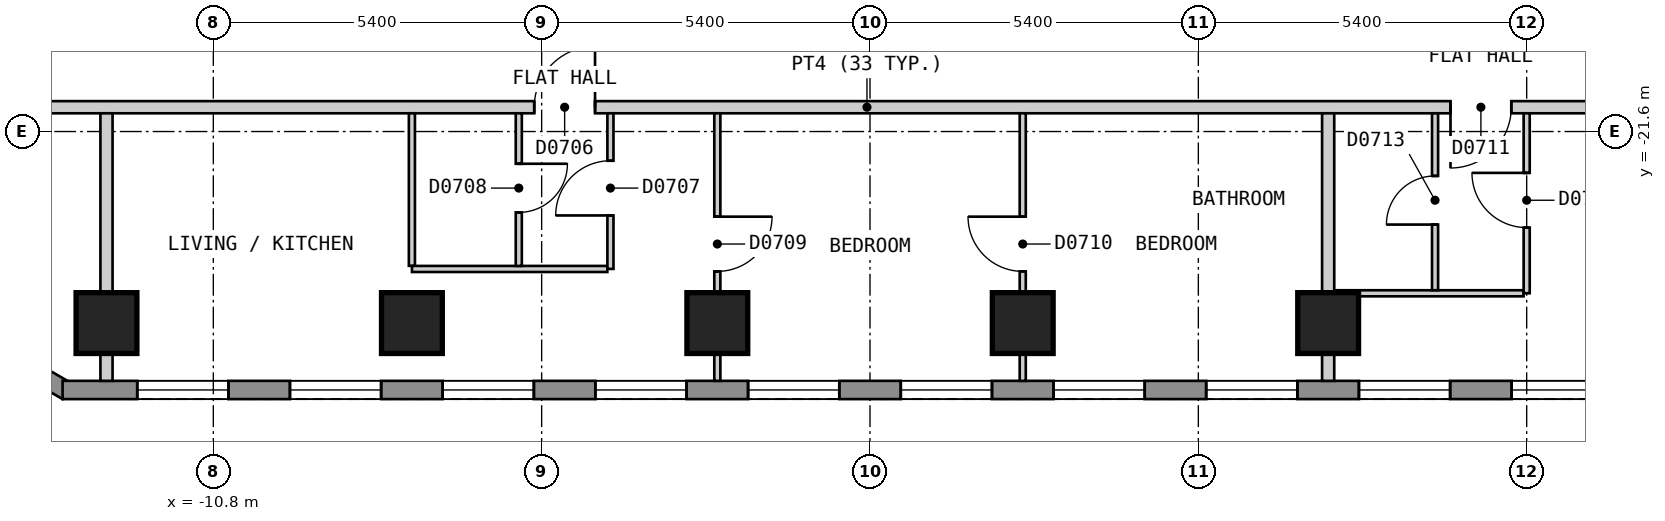
"""IFC4 building model, lengths in metres.
Left out: names, types, materials, properties, quantities, classifications, styles, units other than length and angle.
Written with IfcOpenShell. Run it as: python <this file> out.ifc"""

import sys

from ifc_helpers import new_model, si_unit, direction, frame, frame_2d, origin, origin_2d, place, context, subcontext, project, spatial, polyline, rectangle, outline, extrude, element, fill, save


model = new_model("IFC4")
c1 = context("Model", 3, precision=1e-05, world=origin(), true_north=direction((0.0, 1.0)))
c2 = subcontext(c1, "Body", "Model", "MODEL_VIEW")
j1 = project(units=[si_unit("LENGTHUNIT", "METRE"), si_unit("PLANEANGLEUNIT", "RADIAN")], contexts=[c1])
p1 = place(None, origin())
s1 = spatial("IfcSite", under=j1, at=p1, CompositionType="ELEMENT")
p2 = place(p1, origin())
s2 = spatial("IfcBuilding", under=s1, at=p2, CompositionType="ELEMENT")
p3 = place(p2, frame((0.0, 0.0, 93.0)))
s3 = spatial("IfcBuildingStorey", under=s2, at=p3, CompositionType="ELEMENT", Elevation=93.0)
for number, where, z_axis, x_axis in (
    (1, (-12.557, -24.75, 0.0), (0.0, 0.0, 1.0), (1.0, 0.0, 0.0)),
    (2, (-7.534, -24.75, 0.0), (0.0, 0.0, 1.0), (1.0, 0.0, 0.0)),
    (3, (-2.511, -24.75, 0.0), (0.0, 0.0, 1.0), (1.0, 0.0, 0.0)),
    (4, (2.512, -24.75, 0.0), (0.0, 0.0, 1.0), (1.0, 0.0, 0.0)),
    (5, (7.535, -24.75, 0.0), (0.0, 0.0, 1.0), (1.0, 0.0, 0.0)),
):
    element("IfcColumn", number, at=place(p3, frame(where, z_axis=z_axis, x_axis=x_axis)), inside=s3, PredefinedType="COLUMN", context=c2, shape_type="SweptSolid", body=[
        extrude(rectangle(XDim=1.0, YDim=1.0, at=origin_2d()), origin(), (0.0, 0.0, 1.0), 3.0),
    ])
p4 = place(p3, frame((-17.534, -23.37, 0.0), z_axis=(0.0, 0.0, 1.0), x_axis=(0.866010750942, -0.50002537861, 0.0)))
e6 = element("IfcWall", 6, at=p4, inside=s3, PredefinedType="SOLIDWALL", context=c2, shape_type="SweptSolid", body=[
    extrude(outline(polyline([(0.0, -0.15), (5.0, -0.15), (4.919, 0.15), (0.08, 0.15), (0.0, -0.15)])), origin(), (0.0, 0.0, 1.0), 2.7),
])
p5 = place(p4, frame((0.65, 0.0, 0.15)))
e7 = element("IfcOpeningElement", 7, at=p5, cuts=e6, PredefinedType="OPENING", context=c2, shape_type="SweptSolid", body=[
    extrude(rectangle(XDim=1.2, YDim=2.1, at=frame_2d((0.6, 1.05))), frame((0.0, 0.16, 0.0), z_axis=(0.0, -1.0, 0.0), x_axis=(1.0, 0.0, 0.0)), (0.0, 0.0, 1.0), 0.32),
])
p6 = place(p4, frame((3.15, 0.0, 0.15)))
e8 = element("IfcOpeningElement", 8, at=p6, cuts=e6, PredefinedType="OPENING", context=c2, shape_type="SweptSolid", body=[
    extrude(rectangle(XDim=1.2, YDim=2.1, at=frame_2d((0.6, 1.05))), frame((0.0, 0.16, 0.0), z_axis=(0.0, -1.0, 0.0), x_axis=(1.0, 0.0, 0.0)), (0.0, 0.0, 1.0), 0.32),
])
p7 = place(p3, frame((-13.279, -25.85, 0.0), z_axis=(0.0, 0.0, 1.0), x_axis=(1.0, 0.0, 0.0)))
e9 = element("IfcWall", 9, at=p7, inside=s3, PredefinedType="SOLIDWALL", context=c2, shape_type="SweptSolid", body=[
    extrude(outline(polyline([(0.0, -0.15), (26.558, -0.15), (26.478, 0.15), (0.08, 0.15), (0.0, -0.15)])), origin(), (0.0, 0.0, 1.0), 2.7),
])
p8 = place(p7, frame((1.228, 0.0, 0.15)))
e10 = element("IfcOpeningElement", 10, at=p8, cuts=e9, PredefinedType="OPENING", context=c2, shape_type="SweptSolid", body=[
    extrude(rectangle(XDim=1.5, YDim=2.1, at=frame_2d((0.75, 1.05))), frame((0.0, 0.16, 0.0), z_axis=(0.0, -1.0, 0.0), x_axis=(1.0, 0.0, 0.0)), (0.0, 0.0, 1.0), 0.32),
])
p9 = place(p7, frame((3.739, 0.0, 0.15)))
e11 = element("IfcOpeningElement", 11, at=p9, cuts=e9, PredefinedType="OPENING", context=c2, shape_type="SweptSolid", body=[
    extrude(rectangle(XDim=1.5, YDim=2.1, at=frame_2d((0.75, 1.05))), frame((0.0, 0.16, 0.0), z_axis=(0.0, -1.0, 0.0), x_axis=(1.0, 0.0, 0.0)), (0.0, 0.0, 1.0), 0.32),
])
p10 = place(p7, frame((6.251, 0.0, 0.15)))
e12 = element("IfcOpeningElement", 12, at=p10, cuts=e9, PredefinedType="OPENING", context=c2, shape_type="SweptSolid", body=[
    extrude(rectangle(XDim=1.5, YDim=2.1, at=frame_2d((0.75, 1.05))), frame((0.0, 0.16, 0.0), z_axis=(0.0, -1.0, 0.0), x_axis=(1.0, 0.0, 0.0)), (0.0, 0.0, 1.0), 0.32),
])
p11 = place(p7, frame((8.762, 0.0, 0.15)))
e13 = element("IfcOpeningElement", 13, at=p11, cuts=e9, PredefinedType="OPENING", context=c2, shape_type="SweptSolid", body=[
    extrude(rectangle(XDim=1.5, YDim=2.1, at=frame_2d((0.75, 1.05))), frame((0.0, 0.16, 0.0), z_axis=(0.0, -1.0, 0.0), x_axis=(1.0, 0.0, 0.0)), (0.0, 0.0, 1.0), 0.32),
])
p12 = place(p7, frame((11.274, 0.0, 0.15)))
e14 = element("IfcOpeningElement", 14, at=p12, cuts=e9, PredefinedType="OPENING", context=c2, shape_type="SweptSolid", body=[
    extrude(rectangle(XDim=1.5, YDim=2.1, at=frame_2d((0.75, 1.05))), frame((0.0, 0.16, 0.0), z_axis=(0.0, -1.0, 0.0), x_axis=(1.0, 0.0, 0.0)), (0.0, 0.0, 1.0), 0.32),
])
p13 = place(p7, frame((13.785, 0.0, 0.15)))
e15 = element("IfcOpeningElement", 15, at=p13, cuts=e9, PredefinedType="OPENING", context=c2, shape_type="SweptSolid", body=[
    extrude(rectangle(XDim=1.5, YDim=2.1, at=frame_2d((0.75, 1.05))), frame((0.0, 0.16, 0.0), z_axis=(0.0, -1.0, 0.0), x_axis=(1.0, 0.0, 0.0)), (0.0, 0.0, 1.0), 0.32),
])
p14 = place(p7, frame((16.297, 0.0, 0.15)))
e16 = element("IfcOpeningElement", 16, at=p14, cuts=e9, PredefinedType="OPENING", context=c2, shape_type="SweptSolid", body=[
    extrude(rectangle(XDim=1.5, YDim=2.1, at=frame_2d((0.75, 1.05))), frame((0.0, 0.16, 0.0), z_axis=(0.0, -1.0, 0.0), x_axis=(1.0, 0.0, 0.0)), (0.0, 0.0, 1.0), 0.32),
])
p15 = place(p7, frame((18.808, 0.0, 0.15)))
e17 = element("IfcOpeningElement", 17, at=p15, cuts=e9, PredefinedType="OPENING", context=c2, shape_type="SweptSolid", body=[
    extrude(rectangle(XDim=1.5, YDim=2.1, at=frame_2d((0.75, 1.05))), frame((0.0, 0.16, 0.0), z_axis=(0.0, -1.0, 0.0), x_axis=(1.0, 0.0, 0.0)), (0.0, 0.0, 1.0), 0.32),
])
p16 = place(p7, frame((21.32, 0.0, 0.15)))
e18 = element("IfcOpeningElement", 18, at=p16, cuts=e9, PredefinedType="OPENING", context=c2, shape_type="SweptSolid", body=[
    extrude(rectangle(XDim=1.5, YDim=2.1, at=frame_2d((0.75, 1.05))), frame((0.0, 0.16, 0.0), z_axis=(0.0, -1.0, 0.0), x_axis=(1.0, 0.0, 0.0)), (0.0, 0.0, 1.0), 0.32),
])
p17 = place(p7, frame((23.831, 0.0, 0.15)))
e19 = element("IfcOpeningElement", 19, at=p17, cuts=e9, PredefinedType="OPENING", context=c2, shape_type="SweptSolid", body=[
    extrude(rectangle(XDim=1.5, YDim=2.1, at=frame_2d((0.75, 1.05))), frame((0.0, 0.16, 0.0), z_axis=(0.0, -1.0, 0.0), x_axis=(1.0, 0.0, 0.0)), (0.0, 0.0, 1.0), 0.32),
])
p18 = place(p3, frame((-15.499, -21.2, 0.0), z_axis=(0.0, 0.0, 1.0), x_axis=(1.0, 0.0, 0.0)))
e20 = element("IfcWall", 20, at=p18, inside=s3, PredefinedType="PARTITIONING", context=c2, shape_type="SweptSolid", body=[
    extrude(rectangle(XDim=30.898, YDim=0.2, at=frame_2d((15.449, 0.0))), origin(), (0.0, 0.0, 1.0), 2.7),
])
p19 = place(p18, frame((9.977, 0.0, 0.0)))
e21 = element("IfcOpeningElement", 21, at=p19, cuts=e20, PredefinedType="OPENING", context=c2, shape_type="SweptSolid", body=[
    extrude(rectangle(XDim=1.0, YDim=2.1, at=frame_2d((0.5, 1.05))), frame((0.0, 0.11, 0.0), z_axis=(0.0, -1.0, 0.0), x_axis=(1.0, 0.0, 0.0)), (0.0, 0.0, 1.0), 0.22),
])
p20 = place(p18, frame((25.046, 0.0, 0.0)))
e22 = element("IfcOpeningElement", 22, at=p20, cuts=e20, PredefinedType="OPENING", context=c2, shape_type="SweptSolid", body=[
    extrude(rectangle(XDim=1.0, YDim=2.1, at=frame_2d((0.5, 1.05))), frame((0.0, 0.11, 0.0), z_axis=(0.0, -1.0, 0.0), x_axis=(1.0, 0.0, 0.0)), (0.0, 0.0, 1.0), 0.22),
])
p21 = place(p3, frame((-7.534, -21.3, 0.0), z_axis=(0.0, 0.0, 1.0), x_axis=(0.0, -1.0, 0.0)))
e23 = element("IfcWall", 23, at=p21, inside=s3, PredefinedType="PARTITIONING", context=c2, shape_type="SweptSolid", body=[
    extrude(rectangle(XDim=2.509, YDim=0.1, at=frame_2d((1.254, 0.0))), origin(), (0.0, 0.0, 1.0), 2.7),
])
p22 = place(p3, frame((-2.511, -21.3, 0.0), z_axis=(0.0, 0.0, 1.0), x_axis=(0.0, -1.0, 0.0)))
e24 = element("IfcWall", 24, at=p22, inside=s3, PredefinedType="PARTITIONING", context=c2, shape_type="SweptSolid", body=[
    extrude(rectangle(XDim=4.4, YDim=0.1, at=frame_2d((2.2, 0.0))), origin(), (0.0, 0.0, 1.0), 2.7),
])
p23 = place(p22, frame((1.7, 0.0, 0.0)))
e25 = element("IfcOpeningElement", 25, at=p23, cuts=e24, PredefinedType="OPENING", context=c2, shape_type="SweptSolid", body=[
    extrude(rectangle(XDim=0.9, YDim=2.1, at=frame_2d((0.45, 1.05))), frame((0.0, 0.06, 0.0), z_axis=(0.0, -1.0, 0.0), x_axis=(1.0, 0.0, 0.0)), (0.0, 0.0, 1.0), 0.12),
])
p24 = place(p3, frame((-7.533, -23.86, 0.0), z_axis=(0.0, 0.0, 1.0), x_axis=(1.0, 0.0, 0.0)))
e26 = element("IfcWall", 26, at=p24, inside=s3, PredefinedType="PARTITIONING", context=c2, shape_type="SweptSolid", body=[
    extrude(rectangle(XDim=3.213, YDim=0.1, at=frame_2d((1.606, 0.0))), origin(), (0.0, 0.0, 1.0), 2.7),
])
p25 = place(p3, frame((7.635, -24.26, 0.0), z_axis=(0.0, 0.0, 1.0), x_axis=(1.0, 0.0, 0.0)))
e27 = element("IfcWall", 27, at=p25, inside=s3, PredefinedType="PARTITIONING", context=c2, shape_type="SweptSolid", body=[
    extrude(rectangle(XDim=3.114, YDim=0.1, at=frame_2d((1.557, 0.0))), origin(), (0.0, 0.0, 1.0), 2.7),
])
p26 = place(p3, frame((9.293, -24.21, 0.0), z_axis=(0.0, 0.0, 1.0), x_axis=(0.0, 1.0, 0.0)))
e28 = element("IfcWall", 28, at=p26, inside=s3, PredefinedType="PARTITIONING", context=c2, shape_type="SweptSolid", body=[
    extrude(rectangle(XDim=2.91, YDim=0.1, at=frame_2d((1.455, 0.0))), origin(), (0.0, 0.0, 1.0), 2.7),
])
p27 = place(p26, frame((1.08, 0.0, 0.0)))
e29 = element("IfcOpeningElement", 29, at=p27, cuts=e28, PredefinedType="OPENING", context=c2, shape_type="SweptSolid", body=[
    extrude(rectangle(XDim=0.8, YDim=2.1, at=frame_2d((0.4, 1.05))), frame((0.0, 0.06, 0.0), z_axis=(0.0, -1.0, 0.0), x_axis=(1.0, 0.0, 0.0)), (0.0, 0.0, 1.0), 0.12),
])
p28 = place(p3, frame((10.8, -24.259, 0.0), z_axis=(0.0, 0.0, 1.0), x_axis=(0.0, 1.0, 0.0)))
e30 = element("IfcWall", 30, at=p28, inside=s3, PredefinedType="PARTITIONING", context=c2, shape_type="SweptSolid", body=[
    extrude(rectangle(XDim=2.959, YDim=0.1, at=frame_2d((1.479, 0.0))), origin(), (0.0, 0.0, 1.0), 2.7),
])
p29 = place(p28, frame((1.079, 0.0, 0.0)))
e31 = element("IfcOpeningElement", 31, at=p29, cuts=e30, PredefinedType="OPENING", context=c2, shape_type="SweptSolid", body=[
    extrude(rectangle(XDim=0.9, YDim=2.1, at=frame_2d((0.45, 1.05))), frame((0.0, 0.06, 0.0), z_axis=(0.0, -1.0, 0.0), x_axis=(1.0, 0.0, 0.0)), (0.0, 0.0, 1.0), 0.12),
])
p30 = place(p3, frame((2.512, -25.7, 0.0), z_axis=(0.0, 0.0, 1.0), x_axis=(0.0, 1.0, 0.0)))
e32 = element("IfcWall", 32, at=p30, inside=s3, PredefinedType="PARTITIONING", context=c2, shape_type="SweptSolid", body=[
    extrude(rectangle(XDim=4.4, YDim=0.1, at=frame_2d((2.2, 0.0))), origin(), (0.0, 0.0, 1.0), 2.7),
])
p31 = place(p30, frame((1.8, 0.0, 0.0)))
e33 = element("IfcOpeningElement", 33, at=p31, cuts=e32, PredefinedType="OPENING", context=c2, shape_type="SweptSolid", body=[
    extrude(rectangle(XDim=0.9, YDim=2.1, at=frame_2d((0.45, 1.05))), frame((0.0, 0.06, 0.0), z_axis=(0.0, -1.0, 0.0), x_axis=(1.0, 0.0, 0.0)), (0.0, 0.0, 1.0), 0.12),
])
p32 = place(p3, frame((-4.269, -23.859, 0.0), z_axis=(0.0, 0.0, 1.0), x_axis=(0.0, 1.0, 0.0)))
e34 = element("IfcWall", 34, at=p32, inside=s3, PredefinedType="PARTITIONING", context=c2, shape_type="SweptSolid", body=[
    extrude(rectangle(XDim=2.559, YDim=0.1, at=frame_2d((1.279, 0.0))), origin(), (0.0, 0.0, 1.0), 2.7),
])
p33 = place(p32, frame((0.879, 0.0, 0.0)))
e35 = element("IfcOpeningElement", 35, at=p33, cuts=e34, PredefinedType="OPENING", context=c2, shape_type="SweptSolid", body=[
    extrude(rectangle(XDim=0.9, YDim=2.1, at=frame_2d((0.45, 1.05))), frame((0.0, 0.06, 0.0), z_axis=(0.0, -1.0, 0.0), x_axis=(1.0, 0.0, 0.0)), (0.0, 0.0, 1.0), 0.12),
])
p34 = place(p3, frame((-5.776, -23.81, 0.0), z_axis=(0.0, 0.0, 1.0), x_axis=(0.0, 1.0, 0.0)))
e36 = element("IfcWall", 36, at=p34, inside=s3, PredefinedType="PARTITIONING", context=c2, shape_type="SweptSolid", body=[
    extrude(rectangle(XDim=2.51, YDim=0.1, at=frame_2d((1.255, 0.0))), origin(), (0.0, 0.0, 1.0), 2.7),
])
p35 = place(p34, frame((0.88, 0.0, 0.0)))
e37 = element("IfcOpeningElement", 37, at=p35, cuts=e36, PredefinedType="OPENING", context=c2, shape_type="SweptSolid", body=[
    extrude(rectangle(XDim=0.8, YDim=2.1, at=frame_2d((0.4, 1.05))), frame((0.0, 0.06, 0.0), z_axis=(0.0, -1.0, 0.0), x_axis=(1.0, 0.0, 0.0)), (0.0, 0.0, 1.0), 0.12),
])
p36 = place(p3, frame((7.535, -21.3, 0.0), z_axis=(0.0, 0.0, 1.0), x_axis=(0.0, -1.0, 0.0)))
e38 = element("IfcWall", 38, at=p36, inside=s3, PredefinedType="PARTITIONING", context=c2, shape_type="SweptSolid", body=[
    extrude(rectangle(XDim=2.98, YDim=0.2, at=frame_2d((1.49, 0.0))), origin(), (0.0, 0.0, 1.0), 2.7),
])
p37 = place(p3, frame((7.535, -25.7, 0.0), z_axis=(0.0, 0.0, 1.0), x_axis=(0.0, 1.0, 0.0)))
e39 = element("IfcWall", 39, at=p37, inside=s3, PredefinedType="PARTITIONING", context=c2, shape_type="SweptSolid", body=[
    extrude(rectangle(XDim=1.46, YDim=0.2, at=frame_2d((0.73, 0.0))), origin(), (0.0, 0.0, 1.0), 2.7),
])
p38 = place(p3, frame((-12.557, -25.7, 0.0), z_axis=(0.0, 0.0, 1.0), x_axis=(0.0, 1.0, 0.0)))
e40 = element("IfcWall", 40, at=p38, inside=s3, PredefinedType="PARTITIONING", context=c2, shape_type="SweptSolid", body=[
    extrude(rectangle(XDim=4.4, YDim=0.2, at=frame_2d((2.2, 0.0))), origin(), (0.0, 0.0, 1.0), 2.7),
])
p39 = place(p8, origin())
e41 = element("IfcWindow", 41, at=p39, inside=s3, PartitioningType="SINGLE_PANEL", PredefinedType="WINDOW", context=c2, shape_type="SweptSolid", body=[
    extrude(rectangle(XDim=1.5, YDim=2.1, at=frame_2d((0.75, 1.05))), frame((0.0, 0.03, 0.0), z_axis=(0.0, -1.0, 0.0), x_axis=(1.0, 0.0, 0.0)), (0.0, 0.0, 1.0), 0.06),
])
fill(e10, e41)
p40 = place(p9, origin())
e42 = element("IfcWindow", 42, at=p40, inside=s3, PartitioningType="SINGLE_PANEL", PredefinedType="WINDOW", context=c2, shape_type="SweptSolid", body=[
    extrude(rectangle(XDim=1.5, YDim=2.1, at=frame_2d((0.75, 1.05))), frame((0.0, 0.03, 0.0), z_axis=(0.0, -1.0, 0.0), x_axis=(1.0, 0.0, 0.0)), (0.0, 0.0, 1.0), 0.06),
])
fill(e11, e42)
p41 = place(p10, origin())
e43 = element("IfcWindow", 43, at=p41, inside=s3, PartitioningType="SINGLE_PANEL", PredefinedType="WINDOW", context=c2, shape_type="SweptSolid", body=[
    extrude(rectangle(XDim=1.5, YDim=2.1, at=frame_2d((0.75, 1.05))), frame((0.0, 0.03, 0.0), z_axis=(0.0, -1.0, 0.0), x_axis=(1.0, 0.0, 0.0)), (0.0, 0.0, 1.0), 0.06),
])
fill(e12, e43)
p42 = place(p11, origin())
e44 = element("IfcWindow", 44, at=p42, inside=s3, PartitioningType="SINGLE_PANEL", PredefinedType="WINDOW", context=c2, shape_type="SweptSolid", body=[
    extrude(rectangle(XDim=1.5, YDim=2.1, at=frame_2d((0.75, 1.05))), frame((0.0, 0.03, 0.0), z_axis=(0.0, -1.0, 0.0), x_axis=(1.0, 0.0, 0.0)), (0.0, 0.0, 1.0), 0.06),
])
fill(e13, e44)
p43 = place(p12, origin())
e45 = element("IfcWindow", 45, at=p43, inside=s3, PartitioningType="SINGLE_PANEL", PredefinedType="WINDOW", context=c2, shape_type="SweptSolid", body=[
    extrude(rectangle(XDim=1.5, YDim=2.1, at=frame_2d((0.75, 1.05))), frame((0.0, 0.03, 0.0), z_axis=(0.0, -1.0, 0.0), x_axis=(1.0, 0.0, 0.0)), (0.0, 0.0, 1.0), 0.06),
])
fill(e14, e45)
p44 = place(p13, origin())
e46 = element("IfcWindow", 46, at=p44, inside=s3, PartitioningType="SINGLE_PANEL", PredefinedType="WINDOW", context=c2, shape_type="SweptSolid", body=[
    extrude(rectangle(XDim=1.5, YDim=2.1, at=frame_2d((0.75, 1.05))), frame((0.0, 0.03, 0.0), z_axis=(0.0, -1.0, 0.0), x_axis=(1.0, 0.0, 0.0)), (0.0, 0.0, 1.0), 0.06),
])
fill(e15, e46)
p45 = place(p14, origin())
e47 = element("IfcWindow", 47, at=p45, inside=s3, PartitioningType="SINGLE_PANEL", PredefinedType="WINDOW", context=c2, shape_type="SweptSolid", body=[
    extrude(rectangle(XDim=1.5, YDim=2.1, at=frame_2d((0.75, 1.05))), frame((0.0, 0.03, 0.0), z_axis=(0.0, -1.0, 0.0), x_axis=(1.0, 0.0, 0.0)), (0.0, 0.0, 1.0), 0.06),
])
fill(e16, e47)
p46 = place(p15, origin())
e48 = element("IfcWindow", 48, at=p46, inside=s3, PartitioningType="SINGLE_PANEL", PredefinedType="WINDOW", context=c2, shape_type="SweptSolid", body=[
    extrude(rectangle(XDim=1.5, YDim=2.1, at=frame_2d((0.75, 1.05))), frame((0.0, 0.03, 0.0), z_axis=(0.0, -1.0, 0.0), x_axis=(1.0, 0.0, 0.0)), (0.0, 0.0, 1.0), 0.06),
])
fill(e17, e48)
p47 = place(p16, origin())
e49 = element("IfcWindow", 49, at=p47, inside=s3, PartitioningType="SINGLE_PANEL", PredefinedType="WINDOW", context=c2, shape_type="SweptSolid", body=[
    extrude(rectangle(XDim=1.5, YDim=2.1, at=frame_2d((0.75, 1.05))), frame((0.0, 0.03, 0.0), z_axis=(0.0, -1.0, 0.0), x_axis=(1.0, 0.0, 0.0)), (0.0, 0.0, 1.0), 0.06),
])
fill(e18, e49)
p48 = place(p17, origin())
e50 = element("IfcWindow", 50, at=p48, inside=s3, PartitioningType="SINGLE_PANEL", PredefinedType="WINDOW", context=c2, shape_type="SweptSolid", body=[
    extrude(rectangle(XDim=1.5, YDim=2.1, at=frame_2d((0.75, 1.05))), frame((0.0, 0.03, 0.0), z_axis=(0.0, -1.0, 0.0), x_axis=(1.0, 0.0, 0.0)), (0.0, 0.0, 1.0), 0.06),
])
fill(e19, e50)
p49 = place(p19, origin())
e51 = element("IfcDoor", 51, at=p49, inside=s3, OperationType="SINGLE_SWING_RIGHT", PredefinedType="DOOR", context=c2, shape_type="SweptSolid", body=[
    extrude(rectangle(XDim=1.0, YDim=2.1, at=frame_2d((0.5, 1.05))), frame((0.0, 0.025, 0.0), z_axis=(0.0, -1.0, 0.0), x_axis=(1.0, 0.0, 0.0)), (0.0, 0.0, 1.0), 0.05),
])
fill(e21, e51)
p50 = place(p33, origin())
e52 = element("IfcDoor", 52, at=p50, inside=s3, OperationType="SINGLE_SWING_LEFT", PredefinedType="DOOR", context=c2, shape_type="SweptSolid", body=[
    extrude(rectangle(XDim=0.9, YDim=2.1, at=frame_2d((0.45, 1.05))), frame((0.0, 0.025, 0.0), z_axis=(0.0, -1.0, 0.0), x_axis=(1.0, 0.0, 0.0)), (0.0, 0.0, 1.0), 0.05),
])
fill(e35, e52)
p51 = place(p35, origin())
e53 = element("IfcDoor", 53, at=p51, inside=s3, OperationType="SINGLE_SWING_RIGHT", PredefinedType="DOOR", context=c2, shape_type="SweptSolid", body=[
    extrude(rectangle(XDim=0.8, YDim=2.1, at=frame_2d((0.4, 1.05))), frame((0.0, 0.025, 0.0), z_axis=(0.0, -1.0, 0.0), x_axis=(1.0, 0.0, 0.0)), (0.0, 0.0, 1.0), 0.05),
])
fill(e37, e53)
p52 = place(p23, origin())
e54 = element("IfcDoor", 54, at=p52, inside=s3, OperationType="SINGLE_SWING_LEFT", PredefinedType="DOOR", context=c2, shape_type="SweptSolid", body=[
    extrude(rectangle(XDim=0.9, YDim=2.1, at=frame_2d((0.45, 1.05))), frame((0.0, 0.025, 0.0), z_axis=(0.0, -1.0, 0.0), x_axis=(1.0, 0.0, 0.0)), (0.0, 0.0, 1.0), 0.05),
])
fill(e25, e54)
p53 = place(p31, origin())
e55 = element("IfcDoor", 55, at=p53, inside=s3, OperationType="SINGLE_SWING_RIGHT", PredefinedType="DOOR", context=c2, shape_type="SweptSolid", body=[
    extrude(rectangle(XDim=0.9, YDim=2.1, at=frame_2d((0.45, 1.05))), frame((0.0, 0.025, 0.0), z_axis=(0.0, -1.0, 0.0), x_axis=(1.0, 0.0, 0.0)), (0.0, 0.0, 1.0), 0.05),
])
fill(e33, e55)
p54 = place(p20, origin())
e56 = element("IfcDoor", 56, at=p54, inside=s3, OperationType="SINGLE_SWING_LEFT", PredefinedType="DOOR", context=c2, shape_type="SweptSolid", body=[
    extrude(rectangle(XDim=1.0, YDim=2.1, at=frame_2d((0.5, 1.05))), frame((0.0, 0.025, 0.0), z_axis=(0.0, -1.0, 0.0), x_axis=(1.0, 0.0, 0.0)), (0.0, 0.0, 1.0), 0.05),
])
fill(e22, e56)
p55 = place(p29, origin())
e57 = element("IfcDoor", 57, at=p55, inside=s3, OperationType="SINGLE_SWING_RIGHT", PredefinedType="DOOR", context=c2, shape_type="SweptSolid", body=[
    extrude(rectangle(XDim=0.9, YDim=2.1, at=frame_2d((0.45, 1.05))), frame((0.0, 0.025, 0.0), z_axis=(0.0, -1.0, 0.0), x_axis=(1.0, 0.0, 0.0)), (0.0, 0.0, 1.0), 0.05),
])
fill(e31, e57)
p56 = place(p27, origin())
e58 = element("IfcDoor", 58, at=p56, inside=s3, OperationType="SINGLE_SWING_LEFT", PredefinedType="DOOR", context=c2, shape_type="SweptSolid", body=[
    extrude(rectangle(XDim=0.8, YDim=2.1, at=frame_2d((0.4, 1.05))), frame((0.0, 0.025, 0.0), z_axis=(0.0, -1.0, 0.0), x_axis=(1.0, 0.0, 0.0)), (0.0, 0.0, 1.0), 0.05),
])
fill(e29, e58)
save(model, sys.argv[1])
